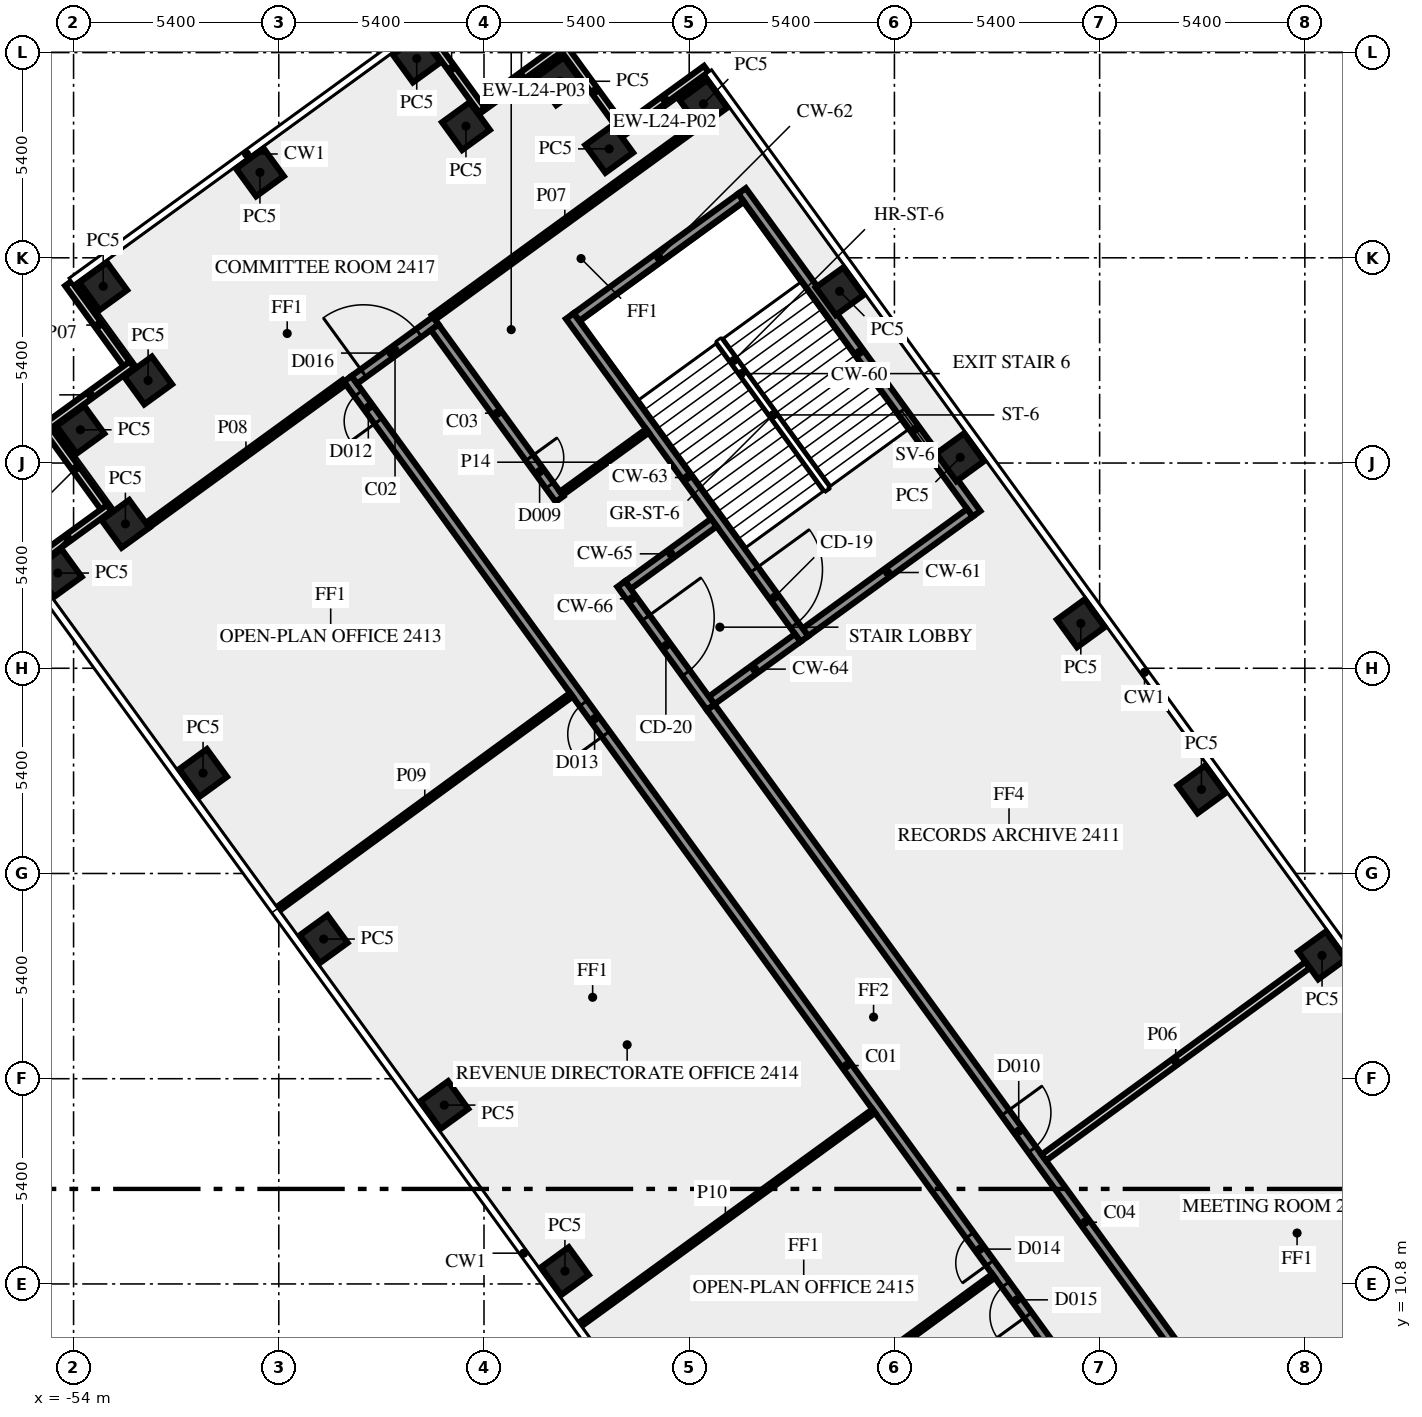
"""IFC4 building model, lengths in metres.
Left out: names, types, materials, properties, quantities, classifications, styles, units other than length and angle.
Written with IfcOpenShell. Run it as: python <this file> out.ifc"""

import sys

from ifc_helpers import new_model, si_unit, direction, frame, frame_2d, origin, origin_2d, place, context, subcontext, project, spatial, rectangle, extrude, element, fill, save


model = new_model("IFC4")
c1 = context("Model", 3, precision=1e-05, world=origin(), true_north=direction((0.0, 1.0)))
c2 = subcontext(c1, "Body", "Model", "MODEL_VIEW")
j1 = project(units=[si_unit("LENGTHUNIT", "METRE"), si_unit("PLANEANGLEUNIT", "RADIAN")], contexts=[c1])
p1 = place(None, origin())
s1 = spatial("IfcSite", under=j1, at=p1, CompositionType="ELEMENT")
p2 = place(p1, origin())
s2 = spatial("IfcBuilding", under=s1, at=p2, CompositionType="ELEMENT")
p3 = place(p2, frame((0.0, 0.0, 105.0)))
s3 = spatial("IfcBuildingStorey", under=s2, at=p3, CompositionType="ELEMENT", Elevation=105.0)
for number, where, z_axis, x_axis in (
    (1, (-21.147, 19.444, 0.0), (0.0, 0.0, 1.0), (-0.588, 0.809, 0.0)),
    (2, (-24.321, 23.812, 0.0), (0.0, 0.0, 1.0), (-0.588, 0.809, 0.0)),
    (3, (-27.495, 28.181, 0.0), (0.0, 0.0, 1.0), (-0.588, 0.809, 0.0)),
    (4, (-30.669, 32.55, 0.0), (0.0, 0.0, 1.0), (-0.588, 0.809, 0.0)),
    (5, (-33.843, 36.919, 0.0), (0.0, 0.0, 1.0), (-0.588, 0.809, 0.0)),
    (6, (-37.425, 41.85, 0.0), (0.0, 0.0, 1.0), (-0.588, 0.809, 0.0)),
    (7, (-39.906, 40.666, 0.0), (0.0, 0.0, 1.0), (-0.588, 0.809, 0.0)),
    (8, (-41.2, 42.445, 0.0), (0.0, 0.0, 1.0), (-0.588, 0.809, 0.0)),
    (9, (-43.675, 41.265, 0.0), (0.0, 0.0, 1.0), (-0.809, -0.588, 0.0)),
    (10, (-44.97, 43.045, 0.0), (0.0, 0.0, 1.0), (-0.809, -0.588, 0.0)),
    (11, (-49.096, 40.047, 0.0), (0.0, 0.0, 1.0), (-0.809, -0.588, 0.0)),
    (12, (-53.22, 37.05, 0.0), (0.0, 0.0, 1.0), (0.588, -0.809, 0.0)),
    (13, (-52.039, 34.571, 0.0), (0.0, 0.0, 1.0), (-0.809, -0.588, 0.0)),
    (14, (-53.82, 33.275, 0.0), (0.0, 0.0, 1.0), (0.588, -0.809, 0.0)),
    (15, (-52.636, 30.8, 0.0), (0.0, 0.0, 1.0), (-0.809, -0.588, 0.0)),
    (16, (-54.415, 29.505, 0.0), (0.0, 0.0, 1.0), (0.588, -0.809, 0.0)),
    (17, (-50.592, 24.243, 0.0), (0.0, 0.0, 1.0), (0.588, -0.809, 0.0)),
    (18, (-47.418, 19.875, 0.0), (0.0, 0.0, 1.0), (0.588, -0.809, 0.0)),
    (19, (-44.244, 15.506, 0.0), (0.0, 0.0, 1.0), (0.588, -0.809, 0.0)),
    (20, (-41.07, 11.137, 0.0), (0.0, 0.0, 1.0), (0.588, -0.809, 0.0)),
):
    element("IfcColumn", number, at=place(p3, frame(where, z_axis=z_axis, x_axis=x_axis)), inside=s3, PredefinedType="COLUMN", context=c2, shape_type="SweptSolid", body=[
        extrude(rectangle(XDim=0.9, YDim=0.9, at=origin_2d()), origin(), (0.0, 0.0, 1.0), 3.65),
    ])
p4 = place(p3, frame((-37.353, 42.768, 0.0), z_axis=(0.0, 0.0, 1.0), x_axis=(-0.809033161865, -0.587762999008, 0.0)))
e21 = element("IfcWall", 21, at=p4, inside=s3, PredefinedType="SOLIDWALL", context=c2, shape_type="SweptSolid", body=[
    extrude(rectangle(XDim=2.7, YDim=0.2, at=frame_2d((1.35, 0.0))), origin(), (0.0, 0.0, 1.0), 3.65),
])
p5 = place(p3, frame((-39.488, 41.094, 0.0), z_axis=(0.0, 0.0, 1.0), x_axis=(-0.587806000234, 0.809001919707, 0.0)))
e22 = element("IfcWall", 22, at=p5, inside=s3, PredefinedType="SOLIDWALL", context=c2, shape_type="SweptSolid", body=[
    extrude(rectangle(XDim=2.7, YDim=0.2, at=frame_2d((1.35, 0.0))), origin(), (0.0, 0.0, 1.0), 3.65),
])
for number, where, z_axis, x_axis in (
    (23, (-41.124, 43.366, 0.0), (0.0, 0.0, 1.0), (-0.809, -0.588, 0.0)),
    (24, (-43.259, 41.691, 0.0), (0.0, 0.0, 1.0), (-0.588, 0.809, 0.0)),
    (25, (-54.14, 37.123, 0.0), (0.0, 0.0, 1.0), (0.588, -0.809, 0.0)),
    (26, (-52.465, 34.987, 0.0), (0.0, 0.0, 1.0), (-0.809, -0.588, 0.0)),
):
    element("IfcWall", number, at=place(p3, frame(where, z_axis=z_axis, x_axis=x_axis)), inside=s3, PredefinedType="SOLIDWALL", context=c2, shape_type="SweptSolid", body=[
        extrude(rectangle(XDim=2.7, YDim=0.2, at=frame_2d((1.35, 0.0))), origin(), (0.0, 0.0, 1.0), 3.65),
    ])
p6 = place(p3, frame((-54.738, 33.351, 0.0), z_axis=(0.0, 0.0, 1.0), x_axis=(0.587779184282, -0.809021403008, 0.0)))
e27 = element("IfcWall", 27, at=p6, inside=s3, PredefinedType="SOLIDWALL", context=c2, shape_type="SweptSolid", body=[
    extrude(rectangle(XDim=2.7, YDim=0.2, at=frame_2d((1.35, 0.0))), origin(), (0.0, 0.0, 1.0), 3.65),
])
p7 = place(p3, frame((-53.063, 31.216, 0.0), z_axis=(0.0, 0.0, 1.0), x_axis=(-0.809033161865, -0.587762999008, 0.0)))
e28 = element("IfcWall", 28, at=p7, inside=s3, PredefinedType="SOLIDWALL", context=c2, shape_type="SweptSolid", body=[
    extrude(rectangle(XDim=2.7, YDim=0.2, at=frame_2d((1.35, 0.0))), origin(), (0.0, 0.0, 1.0), 3.65),
])
p8 = place(p3, frame((-30.24, 31.064, 0.0), z_axis=(0.0, 0.0, 1.0), x_axis=(-0.587795589702, 0.809009483706, 0.0)))
e29 = element("IfcWall", 29, at=p8, inside=s3, PredefinedType="SHEAR", context=c2, shape_type="SweptSolid", body=[
    extrude(rectangle(XDim=10.5, YDim=0.25, at=frame_2d((5.25, 0.0))), origin(), (0.0, 0.0, 1.0), 3.65),
])
p9 = place(p8, frame((2.15, 0.0, 1.0)))
e30 = element("IfcOpeningElement", 30, at=p9, cuts=e29, PredefinedType="OPENING", context=c2, shape_type="SweptSolid", body=[
    extrude(rectangle(XDim=1.2, YDim=1.2, at=frame_2d((0.6, 0.6))), frame((0.0, 0.135, 0.0), z_axis=(0.0, -1.0, 0.0), x_axis=(1.0, 0.0, 0.0)), (0.0, 0.0, 1.0), 0.27),
])
p10 = place(p3, frame((-30.414, 31.092, 0.0), z_axis=(0.0, 0.0, 1.0), x_axis=(-0.8089984606, -0.587810760999, 0.0)))
e31 = element("IfcWall", 31, at=p10, inside=s3, PredefinedType="SHEAR", context=c2, shape_type="SweptSolid", body=[
    extrude(rectangle(XDim=5.35, YDim=0.25, at=frame_2d((2.675, 0.0))), origin(), (0.0, 0.0, 1.0), 3.65),
])
p11 = place(p3, frame((-36.439, 39.384, 0.0), z_axis=(0.0, 0.0, 1.0), x_axis=(-0.809020161303, -0.587780893365, 0.0)))
e32 = element("IfcWall", 32, at=p11, inside=s3, PredefinedType="SHEAR", context=c2, shape_type="SweptSolid", body=[
    extrude(rectangle(XDim=5.35, YDim=0.25, at=frame_2d((2.675, 0.0))), origin(), (0.0, 0.0, 1.0), 3.65),
])
p12 = place(p3, frame((-40.942, 36.267, 0.0), z_axis=(0.0, 0.0, 1.0), x_axis=(0.587795589702, -0.809009483706, 0.0)))
e33 = element("IfcWall", 33, at=p12, inside=s3, PredefinedType="SHEAR", context=c2, shape_type="SweptSolid", body=[
    extrude(rectangle(XDim=10.5, YDim=0.25, at=frame_2d((5.25, 0.0))), origin(), (0.0, 0.0, 1.0), 3.65),
])
p13 = place(p12, frame((8.25, 0.0, 0.0)))
e34 = element("IfcOpeningElement", 34, at=p13, cuts=e33, PredefinedType="OPENING", context=c2, shape_type="SweptSolid", body=[
    extrude(rectangle(XDim=1.8, YDim=2.1, at=frame_2d((0.9, 1.05))), frame((0.0, 0.135, 0.0), z_axis=(0.0, -1.0, 0.0), x_axis=(1.0, 0.0, 0.0)), (0.0, 0.0, 1.0), 0.27),
])
for number, where, z_axis, x_axis in (
    (35, (-34.945, 27.8, 0.0), (0.0, 0.0, 1.0), (-0.809, -0.588, 0.0)),
    (36, (-37.149, 30.834, 0.0), (0.0, 0.0, 1.0), (-0.809, -0.588, 0.0)),
):
    element("IfcWall", number, at=place(p3, frame(where, z_axis=z_axis, x_axis=x_axis)), inside=s3, PredefinedType="SHEAR", context=c2, shape_type="SweptSolid", body=[
        extrude(rectangle(XDim=2.8, YDim=0.25, at=frame_2d((1.4, 0.0))), origin(), (0.0, 0.0, 1.0), 3.65),
    ])
p14 = place(p3, frame((-39.589, 29.216, 0.0), z_axis=(0.0, 0.0, 1.0), x_axis=(0.587772420479, -0.809026317077, 0.0)))
e37 = element("IfcWall", 37, at=p14, inside=s3, PredefinedType="SHEAR", context=c2, shape_type="SweptSolid", body=[
    extrude(rectangle(XDim=4.0, YDim=0.25, at=frame_2d((2.0, 0.0))), origin(), (0.0, 0.0, 1.0), 3.65),
])
p15 = place(p14, frame((1.1, 0.0, 0.0)))
e38 = element("IfcOpeningElement", 38, at=p15, cuts=e37, PredefinedType="OPENING", context=c2, shape_type="SweptSolid", body=[
    extrude(rectangle(XDim=1.8, YDim=2.1, at=frame_2d((0.9, 1.05))), frame((0.0, 0.135, 0.0), z_axis=(0.0, -1.0, 0.0), x_axis=(1.0, 0.0, 0.0)), (0.0, 0.0, 1.0), 0.27),
])
p16 = place(p3, frame((-20.531, -1.523, 0.0), z_axis=(0.0, 0.0, 1.0), x_axis=(-0.587784593204, 0.809017473231, 0.0)))
e39 = element("IfcWall", 39, at=p16, inside=s3, PredefinedType="SOLIDWALL", context=c2, shape_type="SweptSolid", body=[
    extrude(rectangle(XDim=44.67, YDim=0.25, at=frame_2d((22.335, 0.0))), origin(), (0.0, 0.0, 1.0), 3.65),
])
p17 = place(p16, frame((43.296, 0.0, 0.0)))
e40 = element("IfcOpeningElement", 40, at=p17, cuts=e39, PredefinedType="OPENING", context=c2, shape_type="SweptSolid", body=[
    extrude(rectangle(XDim=0.9, YDim=2.1, at=frame_2d((0.45, 1.05))), frame((0.0, 0.135, 0.0), z_axis=(0.0, -1.0, 0.0), x_axis=(1.0, 0.0, 0.0)), (0.0, 0.0, 1.0), 0.27),
])
p18 = place(p16, frame((15.916, 0.0, 0.0)))
e41 = element("IfcOpeningElement", 41, at=p18, cuts=e39, PredefinedType="OPENING", context=c2, shape_type="SweptSolid", body=[
    extrude(rectangle(XDim=0.9, YDim=2.1, at=frame_2d((0.45, 1.05))), frame((0.0, 0.135, 0.0), z_axis=(0.0, -1.0, 0.0), x_axis=(1.0, 0.0, 0.0)), (0.0, 0.0, 1.0), 0.27),
])
p19 = place(p16, frame((33.116, 0.0, 0.0)))
e42 = element("IfcOpeningElement", 42, at=p19, cuts=e39, PredefinedType="OPENING", context=c2, shape_type="SweptSolid", body=[
    extrude(rectangle(XDim=1.0, YDim=2.1, at=frame_2d((0.5, 1.05))), frame((0.0, 0.135, 0.0), z_axis=(0.0, -1.0, 0.0), x_axis=(1.0, 0.0, 0.0)), (0.0, 0.0, 1.0), 0.27),
])
p20 = place(p16, frame((14.216, 0.0, 0.0)))
e43 = element("IfcOpeningElement", 43, at=p20, cuts=e39, PredefinedType="OPENING", context=c2, shape_type="SweptSolid", body=[
    extrude(rectangle(XDim=1.0, YDim=2.1, at=frame_2d((0.5, 1.05))), frame((0.0, 0.135, 0.0), z_axis=(0.0, -1.0, 0.0), x_axis=(1.0, 0.0, 0.0)), (0.0, 0.0, 1.0), 0.27),
])
p21 = place(p3, frame((-46.613, 34.588, 0.0), z_axis=(0.0, 0.0, 1.0), x_axis=(0.808994936898, 0.587815610607, 0.0)))
e44 = element("IfcWall", 44, at=p21, inside=s3, PredefinedType="SOLIDWALL", context=c2, shape_type="SweptSolid", body=[
    extrude(rectangle(XDim=2.65, YDim=0.25, at=frame_2d((1.325, 0.0))), origin(), (0.0, 0.0, 1.0), 3.65),
])
p22 = place(p21, frame((0.299, 0.0, 0.0)))
e45 = element("IfcOpeningElement", 45, at=p22, cuts=e44, PredefinedType="OPENING", context=c2, shape_type="SweptSolid", body=[
    extrude(rectangle(XDim=1.8, YDim=2.1, at=frame_2d((0.9, 1.05))), frame((0.0, 0.135, 0.0), z_axis=(0.0, -1.0, 0.0), x_axis=(1.0, 0.0, 0.0)), (0.0, 0.0, 1.0), 0.27),
])
p23 = place(p3, frame((-44.497, 35.971, 0.0), z_axis=(0.0, 0.0, 1.0), x_axis=(0.587742866856, -0.809047787501, 0.0)))
e46 = element("IfcWall", 46, at=p23, inside=s3, PredefinedType="SOLIDWALL", context=c2, shape_type="SweptSolid", body=[
    extrude(rectangle(XDim=5.586, YDim=0.25, at=frame_2d((2.793, 0.0))), origin(), (0.0, 0.0, 1.0), 3.65),
])
p24 = place(p23, frame((4.245, 0.0, 0.0)))
e47 = element("IfcOpeningElement", 47, at=p24, cuts=e46, PredefinedType="OPENING", context=c2, shape_type="SweptSolid", body=[
    extrude(rectangle(XDim=0.9, YDim=2.1, at=frame_2d((0.45, 1.05))), frame((0.0, 0.135, 0.0), z_axis=(0.0, -1.0, 0.0), x_axis=(1.0, 0.0, 0.0)), (0.0, 0.0, 1.0), 0.27),
])
p25 = place(p3, frame((-37.232, 25.972, 0.0), z_axis=(0.0, 0.0, 1.0), x_axis=(0.587786323093, -0.809016216391, 0.0)))
e48 = element("IfcWall", 48, at=p25, inside=s3, PredefinedType="SOLIDWALL", context=c2, shape_type="SweptSolid", body=[
    extrude(rectangle(XDim=33.493, YDim=0.25, at=frame_2d((16.747, 0.0))), origin(), (0.0, 0.0, 1.0), 3.65),
])
p26 = place(p25, frame((13.185, 0.0, 0.0)))
e49 = element("IfcOpeningElement", 49, at=p26, cuts=e48, PredefinedType="OPENING", context=c2, shape_type="SweptSolid", body=[
    extrude(rectangle(XDim=1.2, YDim=2.1, at=frame_2d((0.6, 1.05))), frame((0.0, 0.135, 0.0), z_axis=(0.0, -1.0, 0.0), x_axis=(1.0, 0.0, 0.0)), (0.0, 0.0, 1.0), 0.27),
])
p27 = place(p25, frame((29.152, 0.0, 0.0)))
e50 = element("IfcOpeningElement", 50, at=p27, cuts=e48, PredefinedType="OPENING", context=c2, shape_type="SweptSolid", body=[
    extrude(rectangle(XDim=0.9, YDim=2.1, at=frame_2d((0.45, 1.05))), frame((0.0, 0.135, 0.0), z_axis=(0.0, -1.0, 0.0), x_axis=(1.0, 0.0, 0.0)), (0.0, 0.0, 1.0), 0.27),
])
p28 = place(p3, frame((-28.469, 14.124, 0.0), z_axis=(0.0, 0.0, 1.0), x_axis=(0.807597163234, 0.589734535139, 0.0)))
e51 = element("IfcWall", 51, at=p28, inside=s3, PredefinedType="SOLIDWALL", context=c2, shape_type="SweptSolid", body=[
    extrude(rectangle(XDim=8.595, YDim=0.2, at=frame_2d((4.298, 0.0))), origin(), (0.0, 0.0, 1.0), 3.65),
])
p29 = place(p3, frame((-37.614, 41.257, 0.0), z_axis=(0.0, 0.0, 1.0), x_axis=(-0.808991595707, -0.587820208972, 0.0)))
e52 = element("IfcWall", 52, at=p29, inside=s3, PredefinedType="PARTITIONING", context=c2, shape_type="SweptSolid", body=[
    extrude(rectangle(XDim=8.551, YDim=0.15, at=frame_2d((4.275, 0.0))), origin(), (0.0, 0.0, 1.0), 3.65),
])
p30 = place(p3, frame((-46.877, 34.526, 0.0), z_axis=(0.0, 0.0, 1.0), x_axis=(-0.808993566199, -0.587817497059, 0.0)))
e53 = element("IfcWall", 53, at=p30, inside=s3, PredefinedType="PARTITIONING", context=c2, shape_type="SweptSolid", body=[
    extrude(rectangle(XDim=6.395, YDim=0.15, at=frame_2d((3.197, 0.0))), origin(), (0.0, 0.0, 1.0), 3.65),
])
p31 = place(p3, frame((-48.615, 20.671, 0.0), z_axis=(0.0, 0.0, 1.0), x_axis=(0.807691251741, 0.589605666408, 0.0)))
e54 = element("IfcWall", 54, at=p31, inside=s3, PredefinedType="PARTITIONING", context=c2, shape_type="SweptSolid", body=[
    extrude(rectangle(XDim=9.55, YDim=0.12, at=frame_2d((4.775, 0.0))), origin(), (0.0, 0.0, 1.0), 2.75),
])
p32 = place(p3, frame((-32.943, 15.349, 0.0), z_axis=(0.0, 0.0, 1.0), x_axis=(-0.80903787798, -0.587756507402, 0.0)))
e55 = element("IfcWall", 55, at=p32, inside=s3, PredefinedType="PARTITIONING", context=c2, shape_type="SweptSolid", body=[
    extrude(rectangle(XDim=9.652, YDim=0.12, at=frame_2d((4.826, 0.0))), origin(), (0.0, 0.0, 1.0), 2.75),
])
p33 = place(p3, frame((-37.506, 5.381, 0.0), z_axis=(0.0, 0.0, 1.0), x_axis=(0.807645841498, 0.589667868135, 0.0)))
e56 = element("IfcWall", 56, at=p33, inside=s3, PredefinedType="PARTITIONING", context=c2, shape_type="SweptSolid", body=[
    extrude(rectangle(XDim=9.551, YDim=0.12, at=frame_2d((4.775, 0.0))), origin(), (0.0, 0.0, 1.0), 2.75),
])
p34 = place(p3, frame((-41.166, 31.599, 0.0), z_axis=(0.0, 0.0, 1.0), x_axis=(0.809090262332, 0.587684394381, 0.0)))
e57 = element("IfcWall", 57, at=p34, inside=s3, PredefinedType="PARTITIONING", context=c2, shape_type="SweptSolid", body=[
    extrude(rectangle(XDim=2.801, YDim=0.12, at=frame_2d((1.4, 0.0))), origin(), (0.0, 0.0, 1.0), 3.65),
])
p35 = place(p9, origin())
e58 = element("IfcWindow", 58, at=p35, inside=s3, PartitioningType="SINGLE_PANEL", PredefinedType="WINDOW", context=c2, shape_type="SweptSolid", body=[
    extrude(rectangle(XDim=1.2, YDim=1.2, at=frame_2d((0.6, 0.6))), frame((0.0, 0.03, 0.0), z_axis=(0.0, -1.0, 0.0), x_axis=(1.0, 0.0, 0.0)), (0.0, 0.0, 1.0), 0.06),
])
fill(e30, e58)
p36 = place(p13, origin())
e59 = element("IfcDoor", 59, at=p36, inside=s3, OperationType="DOUBLE_DOOR_SINGLE_SWING", PredefinedType="DOOR", context=c2, shape_type="SweptSolid", body=[
    extrude(rectangle(XDim=1.8, YDim=2.1, at=frame_2d((0.9, 1.05))), frame((0.0, 0.025, 0.0), z_axis=(0.0, -1.0, 0.0), x_axis=(1.0, 0.0, 0.0)), (0.0, 0.0, 1.0), 0.05),
])
fill(e34, e59)
p37 = place(p15, origin())
e60 = element("IfcDoor", 60, at=p37, inside=s3, OperationType="DOUBLE_DOOR_SINGLE_SWING", PredefinedType="DOOR", context=c2, shape_type="SweptSolid", body=[
    extrude(rectangle(XDim=1.8, YDim=2.1, at=frame_2d((0.9, 1.05))), frame((0.0, 0.025, 0.0), z_axis=(0.0, -1.0, 0.0), x_axis=(1.0, 0.0, 0.0)), (0.0, 0.0, 1.0), 0.05),
])
fill(e38, e60)
p38 = place(p26, origin())
e61 = element("IfcDoor", 61, at=p38, inside=s3, OperationType="SINGLE_SWING_RIGHT", PredefinedType="DOOR", context=c2, shape_type="SweptSolid", body=[
    extrude(rectangle(XDim=1.2, YDim=2.1, at=frame_2d((0.6, 1.05))), frame((0.0, 0.025, 0.0), z_axis=(0.0, -1.0, 0.0), x_axis=(1.0, 0.0, 0.0)), (0.0, 0.0, 1.0), 0.05),
])
fill(e49, e61)
p39 = place(p24, origin())
e62 = element("IfcDoor", 62, at=p39, inside=s3, OperationType="SINGLE_SWING_RIGHT", PredefinedType="DOOR", context=c2, shape_type="SweptSolid", body=[
    extrude(rectangle(XDim=0.9, YDim=2.1, at=frame_2d((0.45, 1.05))), frame((0.0, 0.025, 0.0), z_axis=(0.0, -1.0, 0.0), x_axis=(1.0, 0.0, 0.0)), (0.0, 0.0, 1.0), 0.05),
])
fill(e47, e62)
p40 = place(p17, origin())
e63 = element("IfcDoor", 63, at=p40, inside=s3, OperationType="SINGLE_SWING_RIGHT", PredefinedType="DOOR", context=c2, shape_type="SweptSolid", body=[
    extrude(rectangle(XDim=0.9, YDim=2.1, at=frame_2d((0.45, 1.05))), frame((0.0, 0.025, 0.0), z_axis=(0.0, -1.0, 0.0), x_axis=(1.0, 0.0, 0.0)), (0.0, 0.0, 1.0), 0.05),
])
fill(e40, e63)
p41 = place(p18, origin())
e64 = element("IfcDoor", 64, at=p41, inside=s3, OperationType="SINGLE_SWING_LEFT", PredefinedType="DOOR", context=c2, shape_type="SweptSolid", body=[
    extrude(rectangle(XDim=0.9, YDim=2.1, at=frame_2d((0.45, 1.05))), frame((0.0, 0.025, 0.0), z_axis=(0.0, -1.0, 0.0), x_axis=(1.0, 0.0, 0.0)), (0.0, 0.0, 1.0), 0.05),
])
fill(e41, e64)
p42 = place(p22, origin())
e65 = element("IfcDoor", 65, at=p42, inside=s3, OperationType="DOUBLE_DOOR_SINGLE_SWING", PredefinedType="DOOR", context=c2, shape_type="SweptSolid", body=[
    extrude(rectangle(XDim=1.8, YDim=2.1, at=frame_2d((0.9, 1.05))), frame((0.0, 0.025, 0.0), z_axis=(0.0, -1.0, 0.0), x_axis=(1.0, 0.0, 0.0)), (0.0, 0.0, 1.0), 0.05),
])
fill(e45, e65)
p43 = place(p19, origin())
e66 = element("IfcDoor", 66, at=p43, inside=s3, OperationType="SINGLE_SWING_RIGHT", PredefinedType="DOOR", context=c2, shape_type="SweptSolid", body=[
    extrude(rectangle(XDim=1.0, YDim=2.1, at=frame_2d((0.5, 1.05))), frame((0.0, 0.025, 0.0), z_axis=(0.0, -1.0, 0.0), x_axis=(1.0, 0.0, 0.0)), (0.0, 0.0, 1.0), 0.05),
])
fill(e42, e66)
p44 = place(p20, origin())
e67 = element("IfcDoor", 67, at=p44, inside=s3, OperationType="SINGLE_SWING_RIGHT", PredefinedType="DOOR", context=c2, shape_type="SweptSolid", body=[
    extrude(rectangle(XDim=1.0, YDim=2.1, at=frame_2d((0.5, 1.05))), frame((0.0, 0.025, 0.0), z_axis=(0.0, -1.0, 0.0), x_axis=(1.0, 0.0, 0.0)), (0.0, 0.0, 1.0), 0.05),
])
fill(e43, e67)
save(model, sys.argv[1])
